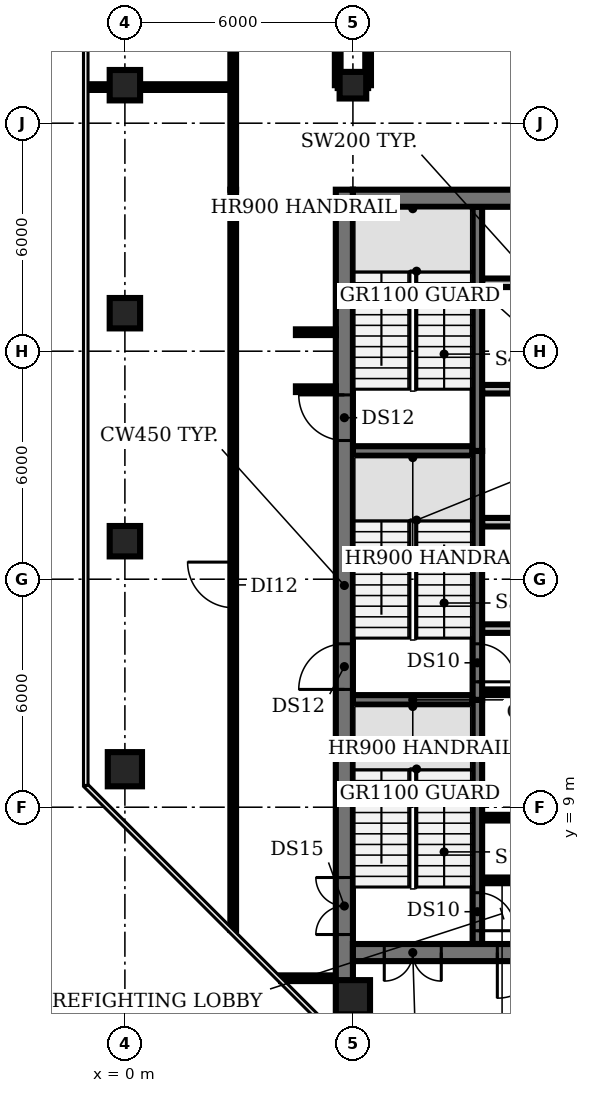
"""IFC4 building model, lengths in metres.
Left out: names, types, materials, properties, quantities, classifications, styles, units other than length and angle.
Written with IfcOpenShell. Run it as: python <this file> out.ifc"""

import sys

from ifc_helpers import new_model, si_unit, direction, frame, frame_2d, origin, origin_2d, place, context, subcontext, project, spatial, rectangle, circle, extrude, element, fill, save


model = new_model("IFC4")
c1 = context("Model", 3, precision=1e-05, world=origin(), true_north=direction((0.0, 1.0)))
c2 = subcontext(c1, "Body", "Model", "MODEL_VIEW")
j1 = project(units=[si_unit("LENGTHUNIT", "METRE"), si_unit("PLANEANGLEUNIT", "RADIAN")], contexts=[c1])
p1 = place(None, origin())
s1 = spatial("IfcSite", under=j1, at=p1, CompositionType="ELEMENT")
p2 = place(p1, origin())
s2 = spatial("IfcBuilding", under=s1, at=p2, CompositionType="ELEMENT")
p3 = place(p2, frame((0.0, 0.0, 218.0)))
s3 = spatial("IfcBuildingStorey", under=s2, at=p3, CompositionType="ELEMENT", Elevation=218.0)
p4 = place(p3, frame((0.0, 10.0, 0.0), z_axis=(0.0, 0.0, 1.0), x_axis=(1.0, 0.0, 0.0)))
e1 = element("IfcColumn", 1, at=p4, inside=s3, PredefinedType="COLUMN", context=c2, shape_type="SweptSolid", body=[
    extrude(circle(Radius=0.45, at=origin_2d()), origin(), (0.0, 0.0, 1.0), 3.85),
])
for number, where, z_axis, x_axis in (
    (2, (0.0, 16.0, 0.0), (0.0, 0.0, 1.0), (1.0, 0.0, 0.0)),
    (3, (0.0, 22.0, 0.0), (0.0, 0.0, 1.0), (1.0, 0.0, 0.0)),
    (4, (0.0, 28.0, 0.0), (0.0, 0.0, 1.0), (1.0, 0.0, 0.0)),
):
    element("IfcColumn", number, at=place(p3, frame(where, z_axis=z_axis, x_axis=x_axis)), inside=s3, PredefinedType="COLUMN", context=c2, shape_type="SweptSolid", body=[
        extrude(rectangle(XDim=0.8, YDim=0.8, at=origin_2d()), origin(), (0.0, 0.0, 1.0), 3.85),
    ])
p5 = place(p3, frame((6.0, 4.0, 0.0), z_axis=(0.0, 0.0, 1.0), x_axis=(1.0, 0.0, 0.0)))
e5 = element("IfcColumn", 5, at=p5, inside=s3, PredefinedType="COLUMN", context=c2, shape_type="SweptSolid", body=[
    extrude(circle(Radius=0.45, at=origin_2d()), origin(), (0.0, 0.0, 1.0), 3.85),
])
p6 = place(p3, frame((6.0, 28.0, 0.0), z_axis=(0.0, 0.0, 1.0), x_axis=(1.0, 0.0, 0.0)))
e6 = element("IfcColumn", 6, at=p6, inside=s3, PredefinedType="COLUMN", context=c2, shape_type="SweptSolid", body=[
    extrude(rectangle(XDim=0.7, YDim=0.7, at=origin_2d()), origin(), (0.0, 0.0, 1.0), 3.85),
])
for number, where, z_axis, x_axis in (
    (7, (9.4, 7.075, 0.0), (0.0, 0.0, 1.0), (1.0, 0.0, 0.0)),
    (8, (9.4, 8.725, 0.0), (0.0, 0.0, 1.0), (1.0, 0.0, 0.0)),
    (9, (9.4, 10.375, 0.0), (0.0, 0.0, 1.0), (1.0, 0.0, 0.0)),
):
    element("IfcWall", number, at=place(p3, frame(where, z_axis=z_axis, x_axis=x_axis)), inside=s3, PredefinedType="SHEAR", context=c2, shape_type="SweptSolid", body=[
        extrude(rectangle(XDim=1.05, YDim=0.15, at=frame_2d((0.525, 0.0))), origin(), (0.0, 0.0, 1.0), 3.85),
    ])
p7 = place(p3, frame((6.0, 11.825, 0.0), z_axis=(0.0, 0.0, 1.0), x_axis=(1.0, 0.0, 0.0)))
e10 = element("IfcWall", 10, at=p7, inside=s3, PredefinedType="SHEAR", context=c2, shape_type="SweptSolid", body=[
    extrude(rectangle(XDim=3.15, YDim=0.25, at=frame_2d((1.575, 0.0))), origin(), (0.0, 0.0, 1.0), 3.85),
])
p8 = place(p3, frame((9.4, 12.025, 0.0), z_axis=(0.0, 0.0, 1.0), x_axis=(1.0, 0.0, 0.0)))
e11 = element("IfcWall", 11, at=p8, inside=s3, PredefinedType="SHEAR", context=c2, shape_type="SweptSolid", body=[
    extrude(rectangle(XDim=1.05, YDim=0.15, at=frame_2d((0.525, 0.0))), origin(), (0.0, 0.0, 1.0), 3.85),
])
p9 = place(p3, frame((9.4, 13.7, 0.0), z_axis=(0.0, 0.0, 1.0), x_axis=(1.0, 0.0, 0.0)))
e12 = element("IfcWall", 12, at=p9, inside=s3, PredefinedType="PARTITIONING", context=c2, shape_type="SweptSolid", body=[
    extrude(rectangle(XDim=4.0, YDim=0.225, at=frame_2d((2.0, 0.0))), origin(), (0.0, 0.0, 1.0), 3.85),
])
p10 = place(p3, frame((9.4, 16.5, 0.0), z_axis=(0.0, 0.0, 1.0), x_axis=(1.0, 0.0, 0.0)))
e13 = element("IfcWall", 13, at=p10, inside=s3, PredefinedType="PARTITIONING", context=c2, shape_type="SweptSolid", body=[
    extrude(rectangle(XDim=14.6, YDim=0.225, at=frame_2d((7.3, 0.0))), origin(), (0.0, 0.0, 1.0), 3.85),
])
p11 = place(p10, frame((1.9, 0.0, 0.0)))
e14 = element("IfcOpeningElement", 14, at=p11, cuts=e13, PredefinedType="OPENING", context=c2, shape_type="SweptSolid", body=[
    extrude(rectangle(XDim=1.0, YDim=2.1, at=frame_2d((0.5, 1.05))), frame((0.0, 0.123, 0.0), z_axis=(0.0, -1.0, 0.0), x_axis=(1.0, 0.0, 0.0)), (0.0, 0.0, 1.0), 0.245),
])
p12 = place(p10, frame((7.475, 0.0, 0.0)))
e15 = element("IfcOpeningElement", 15, at=p12, cuts=e13, PredefinedType="OPENING", context=c2, shape_type="SweptSolid", body=[
    extrude(rectangle(XDim=1.0, YDim=2.1, at=frame_2d((0.5, 1.05))), frame((0.0, 0.123, 0.0), z_axis=(0.0, -1.0, 0.0), x_axis=(1.0, 0.0, 0.0)), (0.0, 0.0, 1.0), 0.245),
])
p13 = place(p10, frame((11.308, 0.0, 0.0)))
e16 = element("IfcOpeningElement", 16, at=p13, cuts=e13, PredefinedType="OPENING", context=c2, shape_type="SweptSolid", body=[
    extrude(rectangle(XDim=0.9, YDim=2.1, at=frame_2d((0.45, 1.05))), frame((0.0, 0.123, 0.0), z_axis=(0.0, -1.0, 0.0), x_axis=(1.0, 0.0, 0.0)), (0.0, 0.0, 1.0), 0.245),
])
p14 = place(p10, frame((13.083, 0.0, 0.0)))
e17 = element("IfcOpeningElement", 17, at=p14, cuts=e13, PredefinedType="OPENING", context=c2, shape_type="SweptSolid", body=[
    extrude(rectangle(XDim=0.9, YDim=2.1, at=frame_2d((0.45, 1.05))), frame((0.0, 0.123, 0.0), z_axis=(0.0, -1.0, 0.0), x_axis=(1.0, 0.0, 0.0)), (0.0, 0.0, 1.0), 0.245),
])
p15 = place(p3, frame((6.0, 18.375, 0.0), z_axis=(0.0, 0.0, 1.0), x_axis=(1.0, 0.0, 0.0)))
e18 = element("IfcWall", 18, at=p15, inside=s3, PredefinedType="SHEAR", context=c2, shape_type="SweptSolid", body=[
    extrude(rectangle(XDim=3.15, YDim=0.25, at=frame_2d((1.575, 0.0))), origin(), (0.0, 0.0, 1.0), 3.85),
])
p16 = place(p3, frame((24.0, 20.0, 0.0), z_axis=(0.0, 0.0, 1.0), x_axis=(-1.0, 0.0, 0.0)))
e19 = element("IfcWall", 19, at=p16, inside=s3, PredefinedType="PARTITIONING", context=c2, shape_type="SweptSolid", body=[
    extrude(rectangle(XDim=14.6, YDim=0.225, at=frame_2d((7.3, 0.0))), origin(), (0.0, 0.0, 1.0), 3.85),
])
p17 = place(p16, frame((12.75, 0.0, 0.0)))
e20 = element("IfcOpeningElement", 20, at=p17, cuts=e19, PredefinedType="OPENING", context=c2, shape_type="SweptSolid", body=[
    extrude(rectangle(XDim=1.1, YDim=2.1, at=frame_2d((0.55, 1.05))), frame((0.0, 0.123, 0.0), z_axis=(0.0, -1.0, 0.0), x_axis=(1.0, 0.0, 0.0)), (0.0, 0.0, 1.0), 0.245),
])
p18 = place(p16, frame((9.95, 0.0, 0.0)))
e21 = element("IfcOpeningElement", 21, at=p18, cuts=e19, PredefinedType="OPENING", context=c2, shape_type="SweptSolid", body=[
    extrude(rectangle(XDim=1.1, YDim=2.1, at=frame_2d((0.55, 1.05))), frame((0.0, 0.123, 0.0), z_axis=(0.0, -1.0, 0.0), x_axis=(1.0, 0.0, 0.0)), (0.0, 0.0, 1.0), 0.245),
])
p19 = place(p16, frame((7.15, 0.0, 0.0)))
e22 = element("IfcOpeningElement", 22, at=p19, cuts=e19, PredefinedType="OPENING", context=c2, shape_type="SweptSolid", body=[
    extrude(rectangle(XDim=1.1, YDim=2.1, at=frame_2d((0.55, 1.05))), frame((0.0, 0.123, 0.0), z_axis=(0.0, -1.0, 0.0), x_axis=(1.0, 0.0, 0.0)), (0.0, 0.0, 1.0), 0.245),
])
p20 = place(p16, frame((4.35, 0.0, 0.0)))
e23 = element("IfcOpeningElement", 23, at=p20, cuts=e19, PredefinedType="OPENING", context=c2, shape_type="SweptSolid", body=[
    extrude(rectangle(XDim=1.1, YDim=2.1, at=frame_2d((0.55, 1.05))), frame((0.0, 0.123, 0.0), z_axis=(0.0, -1.0, 0.0), x_axis=(1.0, 0.0, 0.0)), (0.0, 0.0, 1.0), 0.245),
])
p21 = place(p16, frame((2.308, 0.0, 0.0)))
e24 = element("IfcOpeningElement", 24, at=p21, cuts=e19, PredefinedType="OPENING", context=c2, shape_type="SweptSolid", body=[
    extrude(rectangle(XDim=0.9, YDim=2.1, at=frame_2d((0.45, 1.05))), frame((0.0, 0.123, 0.0), z_axis=(0.0, -1.0, 0.0), x_axis=(1.0, 0.0, 0.0)), (0.0, 0.0, 1.0), 0.245),
])
p22 = place(p16, frame((0.532, 0.0, 0.0)))
e25 = element("IfcOpeningElement", 25, at=p22, cuts=e19, PredefinedType="OPENING", context=c2, shape_type="SweptSolid", body=[
    extrude(rectangle(XDim=0.9, YDim=2.1, at=frame_2d((0.45, 1.05))), frame((0.0, 0.123, 0.0), z_axis=(0.0, -1.0, 0.0), x_axis=(1.0, 0.0, 0.0)), (0.0, 0.0, 1.0), 0.245),
])
p23 = place(p3, frame((9.4, 22.8, 0.0), z_axis=(0.0, 0.0, 1.0), x_axis=(1.0, 0.0, 0.0)))
e26 = element("IfcWall", 26, at=p23, inside=s3, PredefinedType="PARTITIONING", context=c2, shape_type="SweptSolid", body=[
    extrude(rectangle(XDim=14.6, YDim=0.225, at=frame_2d((7.3, 0.0))), origin(), (0.0, 0.0, 1.0), 3.85),
])
p24 = place(p3, frame((9.275, 11.825, 0.0), z_axis=(0.0, 0.0, 1.0), x_axis=(0.0, -1.0, 0.0)))
e27 = element("IfcWall", 27, at=p24, inside=s3, PredefinedType="SHEAR", context=c2, shape_type="SweptSolid", body=[
    extrude(rectangle(XDim=6.425, YDim=0.25, at=frame_2d((3.212, 0.0))), origin(), (0.0, 0.0, 1.0), 3.85),
])
p25 = place(p24, frame((5.075, 0.0, 0.0)))
e28 = element("IfcOpeningElement", 28, at=p25, cuts=e27, PredefinedType="OPENING", context=c2, shape_type="SweptSolid", body=[
    extrude(rectangle(XDim=1.0, YDim=2.1, at=frame_2d((0.5, 1.05))), frame((0.0, 0.135, 0.0), z_axis=(0.0, -1.0, 0.0), x_axis=(1.0, 0.0, 0.0)), (0.0, 0.0, 1.0), 0.27),
])
p26 = place(p3, frame((9.275, 18.375, 0.0), z_axis=(0.0, 0.0, 1.0), x_axis=(0.0, -1.0, 0.0)))
e29 = element("IfcWall", 29, at=p26, inside=s3, PredefinedType="SHEAR", context=c2, shape_type="SweptSolid", body=[
    extrude(rectangle(XDim=6.55, YDim=0.25, at=frame_2d((3.275, 0.0))), origin(), (0.0, 0.0, 1.0), 3.85),
])
p27 = place(p26, frame((5.075, 0.0, 0.0)))
e30 = element("IfcOpeningElement", 30, at=p27, cuts=e29, PredefinedType="OPENING", context=c2, shape_type="SweptSolid", body=[
    extrude(rectangle(XDim=1.0, YDim=2.1, at=frame_2d((0.5, 1.05))), frame((0.0, 0.135, 0.0), z_axis=(0.0, -1.0, 0.0), x_axis=(1.0, 0.0, 0.0)), (0.0, 0.0, 1.0), 0.27),
])
p28 = place(p3, frame((9.275, 18.375, 0.0), z_axis=(0.0, 0.0, 1.0), x_axis=(0.0, 1.0, 0.0)))
e31 = element("IfcWall", 31, at=p28, inside=s3, PredefinedType="SHEAR", context=c2, shape_type="SweptSolid", body=[
    extrude(rectangle(XDim=6.425, YDim=0.25, at=frame_2d((3.212, 0.0))), origin(), (0.0, 0.0, 1.0), 3.85),
])
p29 = place(p3, frame((5.775, 4.42, 0.0), z_axis=(0.0, 0.0, 1.0), x_axis=(0.0, 1.0, 0.0)))
e32 = element("IfcWall", 32, at=p29, inside=s3, PredefinedType="SHEAR", context=c2, shape_type="SweptSolid", body=[
    extrude(rectangle(XDim=20.83, YDim=0.45, at=frame_2d((10.415, 0.0))), origin(), (0.0, 0.0, 1.0), 3.85),
])
p30 = place(p29, frame((1.23, 0.0, 0.0)))
e33 = element("IfcOpeningElement", 33, at=p30, cuts=e32, PredefinedType="OPENING", context=c2, shape_type="SweptSolid", body=[
    extrude(rectangle(XDim=1.5, YDim=2.1, at=frame_2d((0.75, 1.05))), frame((0.0, 0.235, 0.0), z_axis=(0.0, -1.0, 0.0), x_axis=(1.0, 0.0, 0.0)), (0.0, 0.0, 1.0), 0.47),
])
p31 = place(p29, frame((7.68, 0.0, 0.0)))
e34 = element("IfcOpeningElement", 34, at=p31, cuts=e32, PredefinedType="OPENING", context=c2, shape_type="SweptSolid", body=[
    extrude(rectangle(XDim=1.2, YDim=2.1, at=frame_2d((0.6, 1.05))), frame((0.0, 0.235, 0.0), z_axis=(0.0, -1.0, 0.0), x_axis=(1.0, 0.0, 0.0)), (0.0, 0.0, 1.0), 0.47),
])
p32 = place(p29, frame((14.23, 0.0, 0.0)))
e35 = element("IfcOpeningElement", 35, at=p32, cuts=e32, PredefinedType="OPENING", context=c2, shape_type="SweptSolid", body=[
    extrude(rectangle(XDim=1.2, YDim=2.1, at=frame_2d((0.6, 1.05))), frame((0.0, 0.235, 0.0), z_axis=(0.0, -1.0, 0.0), x_axis=(1.0, 0.0, 0.0)), (0.0, 0.0, 1.0), 0.47),
])
p33 = place(p3, frame((24.0, 5.175, 0.0), z_axis=(0.0, 0.0, 1.0), x_axis=(-1.0, 0.0, 0.0)))
e36 = element("IfcWall", 36, at=p33, inside=s3, PredefinedType="SHEAR", context=c2, shape_type="SweptSolid", body=[
    extrude(rectangle(XDim=18.0, YDim=0.45, at=frame_2d((9.0, 0.0))), origin(), (0.0, 0.0, 1.0), 3.85),
])
p34 = place(p33, frame((0.825, 0.0, 0.0)))
e37 = element("IfcOpeningElement", 37, at=p34, cuts=e36, PredefinedType="OPENING", context=c2, shape_type="SweptSolid", body=[
    extrude(rectangle(XDim=1.5, YDim=2.1, at=frame_2d((0.75, 1.05))), frame((0.0, 0.235, 0.0), z_axis=(0.0, -1.0, 0.0), x_axis=(1.0, 0.0, 0.0)), (0.0, 0.0, 1.0), 0.47),
])
p35 = place(p33, frame((15.675, 0.0, 0.0)))
e38 = element("IfcOpeningElement", 38, at=p35, cuts=e36, PredefinedType="OPENING", context=c2, shape_type="SweptSolid", body=[
    extrude(rectangle(XDim=1.5, YDim=2.1, at=frame_2d((0.75, 1.05))), frame((0.0, 0.235, 0.0), z_axis=(0.0, -1.0, 0.0), x_axis=(1.0, 0.0, 0.0)), (0.0, 0.0, 1.0), 0.47),
])
p36 = place(p33, frame((13.0, 0.0, 0.0)))
e39 = element("IfcOpeningElement", 39, at=p36, cuts=e36, PredefinedType="OPENING", context=c2, shape_type="SweptSolid", body=[
    extrude(rectangle(XDim=1.2, YDim=2.1, at=frame_2d((0.6, 1.05))), frame((0.0, 0.235, 0.0), z_axis=(0.0, -1.0, 0.0), x_axis=(1.0, 0.0, 0.0)), (0.0, 0.0, 1.0), 0.47),
])
p37 = place(p33, frame((4.4, 0.0, 0.0)))
e40 = element("IfcOpeningElement", 40, at=p37, cuts=e36, PredefinedType="OPENING", context=c2, shape_type="SweptSolid", body=[
    extrude(rectangle(XDim=1.0, YDim=2.1, at=frame_2d((0.5, 1.05))), frame((0.0, 0.235, 0.0), z_axis=(0.0, -1.0, 0.0), x_axis=(1.0, 0.0, 0.0)), (0.0, 0.0, 1.0), 0.47),
])
p38 = place(p3, frame((6.0, 25.025, 0.0), z_axis=(0.0, 0.0, 1.0), x_axis=(1.0, 0.0, 0.0)))
e41 = element("IfcWall", 41, at=p38, inside=s3, PredefinedType="SHEAR", context=c2, shape_type="SweptSolid", body=[
    extrude(rectangle(XDim=18.0, YDim=0.45, at=frame_2d((9.0, 0.0))), origin(), (0.0, 0.0, 1.0), 3.85),
])
p39 = place(p3, frame((-0.965, 27.95, 0.0), z_axis=(0.0, 0.0, 1.0), x_axis=(1.0, 0.0, 0.0)))
e42 = element("IfcWall", 42, at=p39, inside=s3, PredefinedType="PARTITIONING", context=c2, shape_type="SweptSolid", body=[
    extrude(rectangle(XDim=3.815, YDim=0.15, at=frame_2d((1.908, 0.0))), origin(), (0.0, 0.0, 1.0), 2.88),
])
p40 = place(p3, frame((2.85, 5.77, 0.0), z_axis=(0.0, 0.0, 1.0), x_axis=(0.0, 1.0, 0.0)))
e43 = element("IfcWall", 43, at=p40, inside=s3, PredefinedType="PARTITIONING", context=c2, shape_type="SweptSolid", body=[
    extrude(rectangle(XDim=19.48, YDim=0.15, at=frame_2d((9.74, 0.0))), origin(), (0.0, 0.0, 1.0), 2.88),
])
p41 = place(p40, frame((8.48, 0.0, 0.0)))
e44 = element("IfcOpeningElement", 44, at=p41, cuts=e43, PredefinedType="OPENING", context=c2, shape_type="SweptSolid", body=[
    extrude(rectangle(XDim=1.2, YDim=2.1, at=frame_2d((0.6, 1.05))), frame((0.0, 0.085, 0.0), z_axis=(0.0, -1.0, 0.0), x_axis=(1.0, 0.0, 0.0)), (0.0, 0.0, 1.0), 0.17),
])
p42 = place(p3, frame((2.85, 25.25, 0.0), z_axis=(0.0, 0.0, 1.0), x_axis=(0.0, 1.0, 0.0)))
e45 = element("IfcWall", 45, at=p42, inside=s3, PredefinedType="PARTITIONING", context=c2, shape_type="SweptSolid", body=[
    extrude(rectangle(XDim=3.9, YDim=0.15, at=frame_2d((1.95, 0.0))), origin(), (0.0, 0.0, 1.0), 2.88),
])
p43 = place(p3, frame((4.11, 4.5, 0.0), z_axis=(0.0, 0.0, 1.0), x_axis=(1.0, 0.0, 0.0)))
e46 = element("IfcWall", 46, at=p43, inside=s3, PredefinedType="PARTITIONING", context=c2, shape_type="SweptSolid", body=[
    extrude(rectangle(XDim=1.34, YDim=0.15, at=frame_2d((0.67, 0.0))), origin(), (0.0, 0.0, 1.0), 2.88),
])
for number, where, z_axis, x_axis in (
    (47, (4.5, 20.0, 0.0), (0.0, 0.0, 1.0), (1.0, 0.0, 0.0)),
    (48, (4.5, 21.5, 0.0), (0.0, 0.0, 1.0), (1.0, 0.0, 0.0)),
):
    element("IfcWall", number, at=place(p3, frame(where, z_axis=z_axis, x_axis=x_axis)), inside=s3, PredefinedType="PARTITIONING", context=c2, shape_type="SweptSolid", body=[
        extrude(rectangle(XDim=1.05, YDim=0.15, at=frame_2d((0.525, 0.0))), origin(), (0.0, 0.0, 1.0), 2.88),
    ])
p44 = place(p3, frame((5.6, 28.0, 0.0), z_axis=(0.0, 0.0, 1.0), x_axis=(0.0, 1.0, 0.0)))
e49 = element("IfcWall", 49, at=p44, inside=s3, PredefinedType="PARTITIONING", context=c2, shape_type="SweptSolid", body=[
    extrude(rectangle(XDim=1.15, YDim=0.15, at=frame_2d((0.575, 0.0))), origin(), (0.0, 0.0, 1.0), 2.88),
])
p45 = place(p3, frame((5.6, 28.0, 0.0), z_axis=(0.0, 0.0, 1.0), x_axis=(1.0, 0.0, 0.0)))
e50 = element("IfcWall", 50, at=p45, inside=s3, PredefinedType="PARTITIONING", context=c2, shape_type="SweptSolid", body=[
    extrude(rectangle(XDim=0.8, YDim=0.15, at=frame_2d((0.4, 0.0))), origin(), (0.0, 0.0, 1.0), 2.88),
])
p46 = place(p3, frame((6.4, 28.0, 0.0), z_axis=(0.0, 0.0, 1.0), x_axis=(0.0, 1.0, 0.0)))
e51 = element("IfcWall", 51, at=p46, inside=s3, PredefinedType="PARTITIONING", context=c2, shape_type="SweptSolid", body=[
    extrude(rectangle(XDim=1.15, YDim=0.15, at=frame_2d((0.575, 0.0))), origin(), (0.0, 0.0, 1.0), 2.88),
])
p47 = place(p25, origin())
e52 = element("IfcDoor", 52, at=p47, inside=s3, OperationType="SINGLE_SWING_RIGHT", PredefinedType="DOOR", context=c2, shape_type="SweptSolid", body=[
    extrude(rectangle(XDim=1.0, YDim=2.1, at=frame_2d((0.5, 1.05))), frame((0.0, 0.025, 0.0), z_axis=(0.0, -1.0, 0.0), x_axis=(1.0, 0.0, 0.0)), (0.0, 0.0, 1.0), 0.05),
])
fill(e28, e52)
p48 = place(p27, origin())
e53 = element("IfcDoor", 53, at=p48, inside=s3, OperationType="SINGLE_SWING_RIGHT", PredefinedType="DOOR", context=c2, shape_type="SweptSolid", body=[
    extrude(rectangle(XDim=1.0, YDim=2.1, at=frame_2d((0.5, 1.05))), frame((0.0, 0.025, 0.0), z_axis=(0.0, -1.0, 0.0), x_axis=(1.0, 0.0, 0.0)), (0.0, 0.0, 1.0), 0.05),
])
fill(e30, e53)
p49 = place(p30, origin())
e54 = element("IfcDoor", 54, at=p49, inside=s3, OperationType="DOUBLE_DOOR_SINGLE_SWING", PredefinedType="DOOR", context=c2, shape_type="SweptSolid", body=[
    extrude(rectangle(XDim=1.5, YDim=2.1, at=frame_2d((0.75, 1.05))), frame((0.0, 0.025, 0.0), z_axis=(0.0, -1.0, 0.0), x_axis=(1.0, 0.0, 0.0)), (0.0, 0.0, 1.0), 0.05),
])
fill(e33, e54)
p50 = place(p31, origin())
e55 = element("IfcDoor", 55, at=p50, inside=s3, OperationType="SINGLE_SWING_LEFT", PredefinedType="DOOR", context=c2, shape_type="SweptSolid", body=[
    extrude(rectangle(XDim=1.2, YDim=2.1, at=frame_2d((0.6, 1.05))), frame((0.0, 0.025, 0.0), z_axis=(0.0, -1.0, 0.0), x_axis=(1.0, 0.0, 0.0)), (0.0, 0.0, 1.0), 0.05),
])
fill(e34, e55)
p51 = place(p32, origin())
e56 = element("IfcDoor", 56, at=p51, inside=s3, OperationType="SINGLE_SWING_RIGHT", PredefinedType="DOOR", context=c2, shape_type="SweptSolid", body=[
    extrude(rectangle(XDim=1.2, YDim=2.1, at=frame_2d((0.6, 1.05))), frame((0.0, 0.025, 0.0), z_axis=(0.0, -1.0, 0.0), x_axis=(1.0, 0.0, 0.0)), (0.0, 0.0, 1.0), 0.05),
])
fill(e35, e56)
p52 = place(p35, origin())
e57 = element("IfcDoor", 57, at=p52, inside=s3, OperationType="DOUBLE_DOOR_SINGLE_SWING", PredefinedType="DOOR", context=c2, shape_type="SweptSolid", body=[
    extrude(rectangle(XDim=1.5, YDim=2.1, at=frame_2d((0.75, 1.05))), frame((0.0, 0.025, 0.0), z_axis=(0.0, -1.0, 0.0), x_axis=(1.0, 0.0, 0.0)), (0.0, 0.0, 1.0), 0.05),
])
fill(e38, e57)
p53 = place(p36, origin())
e58 = element("IfcDoor", 58, at=p53, inside=s3, OperationType="SINGLE_SWING_RIGHT", PredefinedType="DOOR", context=c2, shape_type="SweptSolid", body=[
    extrude(rectangle(XDim=1.2, YDim=2.1, at=frame_2d((0.6, 1.05))), frame((0.0, 0.025, 0.0), z_axis=(0.0, -1.0, 0.0), x_axis=(1.0, 0.0, 0.0)), (0.0, 0.0, 1.0), 0.05),
])
fill(e39, e58)
p54 = place(p41, origin())
e59 = element("IfcDoor", 59, at=p54, inside=s3, OperationType="SINGLE_SWING_RIGHT", PredefinedType="DOOR", context=c2, shape_type="SweptSolid", body=[
    extrude(rectangle(XDim=1.2, YDim=2.1, at=frame_2d((0.6, 1.05))), frame((0.0, 0.025, 0.0), z_axis=(0.0, -1.0, 0.0), x_axis=(1.0, 0.0, 0.0)), (0.0, 0.0, 1.0), 0.05),
])
fill(e44, e59)
save(model, sys.argv[1])
